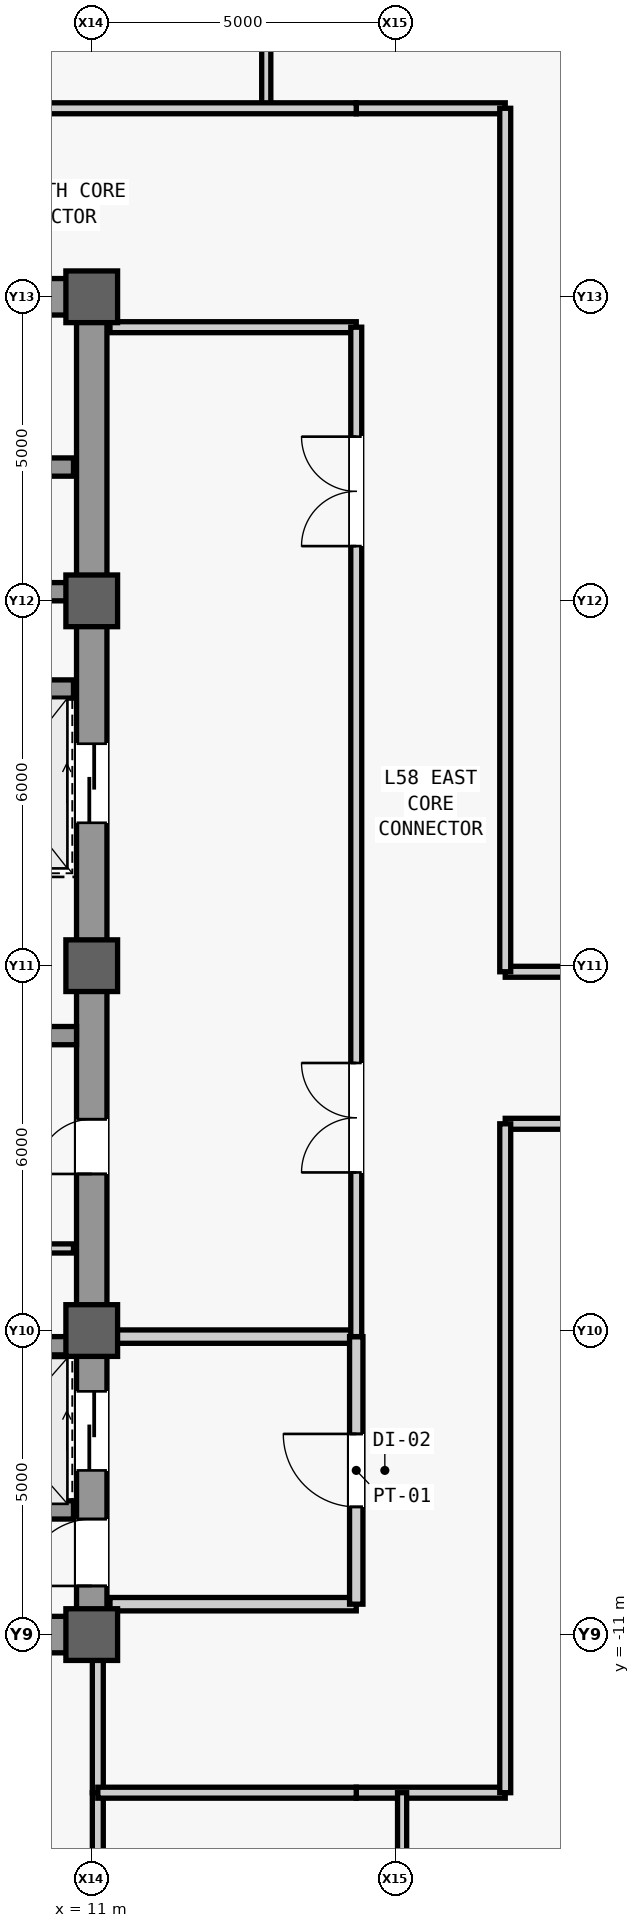
"""IFC4 building model, lengths in metres.
Left out: names, types, materials, properties, quantities, classifications, styles, units other than length and angle.
Written with IfcOpenShell. Run it as: python <this file> out.ifc"""

import sys

from ifc_helpers import new_model, si_unit, direction, frame, frame_2d, origin, origin_2d, place, context, subcontext, project, spatial, rectangle, extrude, source, transform, mapped, element, fill, save


model = new_model("IFC4")
c1 = context("Model", 3, precision=1e-05, world=origin(), true_north=direction((0.0, 1.0)))
c2 = subcontext(c1, "Body", "Model", "MODEL_VIEW")
j1 = project(units=[si_unit("LENGTHUNIT", "METRE"), si_unit("PLANEANGLEUNIT", "RADIAN")], contexts=[c1])
p1 = place(None, origin())
s1 = spatial("IfcSite", under=j1, at=p1, CompositionType="ELEMENT")
p2 = place(p1, origin())
s2 = spatial("IfcBuilding", under=s1, at=p2, CompositionType="ELEMENT")
p3 = place(p2, frame((0.0, 0.0, 247.1)))
s3 = spatial("IfcBuildingStorey", under=s2, at=p3, CompositionType="ELEMENT", Elevation=247.1)
m1 = source(origin(), c2, "Body", "SweptSolid", [
    extrude(rectangle(XDim=22.0, YDim=0.5, at=frame_2d((11.0, 0.0))), origin(), (0.0, 0.0, 1.0), 3.78),
])
p4 = place(p3, frame((11.0, -11.0, 0.0), z_axis=(0.0, 0.0, 1.0), x_axis=(0.0, 1.0, 0.0)))
e1 = element("IfcWall", 1, at=p4, inside=s3, PredefinedType="SHEAR", context=c2, shape_type="MappedRepresentation", body=[
    mapped(m1, transform((0.0, 0.0, 0.0), scale=1.0)),
])
m2 = source(origin(), c2, "Body", "SweptSolid", [
    extrude(rectangle(XDim=1.1, YDim=2.2, at=frame_2d((0.55, 1.1))), frame((0.0, 0.26, 0.0), z_axis=(0.0, -1.0, 0.0), x_axis=(1.0, 0.0, 0.0)), (0.0, 0.0, 1.0), 0.52),
])
p5 = place(p4, frame((0.8, 0.0, 0.0)))
e2 = element("IfcOpeningElement", 2, at=p5, cuts=e1, PredefinedType="OPENING", context=c2, shape_type="MappedRepresentation", body=[
    mapped(m2, transform((0.0, 0.0, 0.0), scale=1.0)),
])
m3 = source(origin(), c2, "Body", "SweptSolid", [
    extrude(rectangle(XDim=0.9, YDim=2.15, at=frame_2d((0.45, 1.075))), frame((0.0, 0.26, 0.0), z_axis=(0.0, -1.0, 0.0), x_axis=(1.0, 0.0, 0.0)), (0.0, 0.0, 1.0), 0.52),
])
p6 = place(p4, frame((7.575, 0.0, 0.0)))
e3 = element("IfcOpeningElement", 3, at=p6, cuts=e1, PredefinedType="OPENING", context=c2, shape_type="MappedRepresentation", body=[
    mapped(m3, transform((0.0, 0.0, 0.0), scale=1.0)),
])
m4 = source(origin(), c2, "Body", "SweptSolid", [
    extrude(rectangle(XDim=1.3, YDim=2.3, at=frame_2d((0.65, 1.15))), frame((0.0, 0.26, 0.0), z_axis=(0.0, -1.0, 0.0), x_axis=(1.0, 0.0, 0.0)), (0.0, 0.0, 1.0), 0.52),
])
p7 = place(p4, frame((2.7, 0.0, 0.0)))
e4 = element("IfcOpeningElement", 4, at=p7, cuts=e1, PredefinedType="OPENING", context=c2, shape_type="MappedRepresentation", body=[
    mapped(m4, transform((0.0, 0.0, 0.0), scale=1.0)),
])
p8 = place(p4, frame((13.35, 0.0, 0.0)))
e5 = element("IfcOpeningElement", 5, at=p8, cuts=e1, PredefinedType="OPENING", context=c2, shape_type="MappedRepresentation", body=[
    mapped(m4, transform((0.0, 0.0, 0.0), scale=1.0)),
])
m5 = source(origin(), c2, "Body", "SweptSolid", [
    extrude(rectangle(XDim=5.9, YDim=0.6, at=frame_2d((2.95, 0.0))), origin(), (0.0, 0.0, 1.0), 3.78),
])
p9 = place(p3, frame((4.85, -11.0, 0.0), z_axis=(0.0, 0.0, 1.0), x_axis=(1.0, 0.0, 0.0)))
e6 = element("IfcWall", 6, at=p9, inside=s3, PredefinedType="SHEAR", context=c2, shape_type="MappedRepresentation", body=[
    mapped(m5, transform((0.0, 0.0, 0.0), scale=1.0)),
])
p10 = place(p3, frame((4.85, 11.0, 0.0), z_axis=(0.0, 0.0, 1.0), x_axis=(1.0, 0.0, 0.0)))
e7 = element("IfcWall", 7, at=p10, inside=s3, PredefinedType="SHEAR", context=c2, shape_type="MappedRepresentation", body=[
    mapped(m5, transform((0.0, 0.0, 0.0), scale=1.0)),
])
m6 = source(origin(), c2, "Body", "SweptSolid", [
    extrude(rectangle(XDim=0.9, YDim=2.15, at=frame_2d((0.45, 1.075))), frame((0.0, 0.31, 0.0), z_axis=(0.0, -1.0, 0.0), x_axis=(1.0, 0.0, 0.0)), (0.0, 0.0, 1.0), 0.62),
])
p11 = place(p10, frame((0.5, 0.0, 0.0)))
e8 = element("IfcOpeningElement", 8, at=p11, cuts=e7, PredefinedType="OPENING", context=c2, shape_type="MappedRepresentation", body=[
    mapped(m6, transform((0.0, 0.0, 0.0), scale=1.0)),
])
m7 = source(origin(), c2, "Body", "SweptSolid", [
    extrude(rectangle(XDim=5.65, YDim=0.3, at=frame_2d((2.825, 0.0))), origin(), (0.0, 0.0, 1.0), 3.78),
])
p12 = place(p3, frame((5.1, -1.15, 0.0), z_axis=(0.0, 0.0, 1.0), x_axis=(1.0, 0.0, 0.0)))
e9 = element("IfcWall", 9, at=p12, inside=s3, PredefinedType="SHEAR", context=c2, shape_type="MappedRepresentation", body=[
    mapped(m7, transform((0.0, 0.0, 0.0), scale=1.0)),
])
m8 = source(origin(), c2, "Body", "SweptSolid", [
    extrude(rectangle(XDim=0.85, YDim=0.85, at=origin_2d()), origin(), (0.0, 0.0, 1.0), 4.0),
])
for number, where, z_axis, x_axis in (
    (10, (11.0, -11.0, 0.0), (0.0, 0.0, 1.0), (1.0, 0.0, 0.0)),
    (11, (11.0, -6.0, 0.0), (0.0, 0.0, 1.0), (1.0, 0.0, 0.0)),
    (12, (11.0, 0.0, 0.0), (0.0, 0.0, 1.0), (1.0, 0.0, 0.0)),
    (13, (11.0, 6.0, 0.0), (0.0, 0.0, 1.0), (1.0, 0.0, 0.0)),
    (14, (11.0, 11.0, 0.0), (0.0, 0.0, 1.0), (1.0, 0.0, 0.0)),
):
    element("IfcColumn", number, at=place(p3, frame(where, z_axis=z_axis, x_axis=x_axis)), inside=s3, PredefinedType="COLUMN", context=c2, shape_type="MappedRepresentation", body=[
        mapped(m8, transform((0.0, 0.0, 0.0), scale=1.0)),
    ])
m9 = source(origin(), c2, "Body", "SweptSolid", [
    extrude(rectangle(XDim=2.2, YDim=0.3, at=frame_2d((1.1, 0.0))), origin(), (0.0, 0.0, 1.0), 3.78),
])
for number, where, z_axis, x_axis in (
    (15, (8.5, -8.95, 0.0), (0.0, 0.0, 1.0), (1.0, 0.0, 0.0)),
    (16, (8.5, -6.25, 0.0), (0.0, 0.0, 1.0), (1.0, 0.0, 0.0)),
):
    element("IfcWall", number, at=place(p3, frame(where, z_axis=z_axis, x_axis=x_axis)), inside=s3, PredefinedType="SHEAR", context=c2, shape_type="MappedRepresentation", body=[
        mapped(m9, transform((0.0, 0.0, 0.0), scale=1.0)),
    ])
m10 = source(origin(), c2, "Body", "SweptSolid", [
    extrude(rectangle(XDim=2.3, YDim=0.3, at=frame_2d((1.15, 0.0))), origin(), (0.0, 0.0, 1.0), 3.78),
])
for number, where, z_axis, x_axis in (
    (17, (8.4, 4.55, 0.0), (0.0, 0.0, 1.0), (1.0, 0.0, 0.0)),
    (18, (8.4, 6.15, 0.0), (0.0, 0.0, 1.0), (1.0, 0.0, 0.0)),
    (19, (8.4, 8.2, 0.0), (0.0, 0.0, 1.0), (1.0, 0.0, 0.0)),
):
    element("IfcWall", number, at=place(p3, frame(where, z_axis=z_axis, x_axis=x_axis)), inside=s3, PredefinedType="SHEAR", context=c2, shape_type="MappedRepresentation", body=[
        mapped(m10, transform((0.0, 0.0, 0.0), scale=1.0)),
    ])
m11 = source(origin(), c2, "Body", "SweptSolid", [
    extrude(rectangle(XDim=2.05, YDim=0.15, at=frame_2d((1.025, 0.0))), origin(), (0.0, 0.0, 1.0), 3.78),
])
p13 = place(p3, frame((8.65, -4.65, 0.0), z_axis=(0.0, 0.0, 1.0), x_axis=(1.0, 0.0, 0.0)))
e20 = element("IfcWall", 20, at=p13, inside=s3, PredefinedType="PARTITIONING", context=c2, shape_type="MappedRepresentation", body=[
    mapped(m11, transform((0.0, 0.0, 0.0), scale=1.0)),
])
m12 = source(origin(), c2, "Body", "SweptSolid", [
    extrude(rectangle(XDim=4.05, YDim=0.22, at=frame_2d((2.025, 0.0))), origin(), (0.0, 0.0, 1.0), 3.78),
])
p14 = place(p3, frame((11.3, -10.5, 0.0), z_axis=(0.0, 0.0, 1.0), x_axis=(1.0, 0.0, 0.0)))
e21 = element("IfcWall", 21, at=p14, inside=s3, PredefinedType="PARTITIONING", context=c2, shape_type="MappedRepresentation", body=[
    mapped(m12, transform((0.0, 0.0, 0.0), scale=1.0)),
])
m13 = source(origin(), c2, "Body", "SweptSolid", [
    extrude(rectangle(XDim=4.05, YDim=0.22, at=frame_2d((2.025, 0.0))), origin(), (0.0, 0.0, 1.0), 3.085),
])
p15 = place(p3, frame((11.3, -6.1, 0.0), z_axis=(0.0, 0.0, 1.0), x_axis=(1.0, 0.0, 0.0)))
e22 = element("IfcWall", 22, at=p15, inside=s3, PredefinedType="PARTITIONING", context=c2, shape_type="MappedRepresentation", body=[
    mapped(m13, transform((0.0, 0.0, 0.0), scale=1.0)),
])
m14 = source(origin(), c2, "Body", "SweptSolid", [
    extrude(rectangle(XDim=4.4, YDim=0.22, at=frame_2d((2.2, 0.0))), origin(), (0.0, 0.0, 1.0), 3.78),
])
p16 = place(p3, frame((15.35, -10.5, 0.0), z_axis=(0.0, 0.0, 1.0), x_axis=(0.0, 1.0, 0.0)))
e23 = element("IfcWall", 23, at=p16, inside=s3, PredefinedType="PARTITIONING", context=c2, shape_type="MappedRepresentation", body=[
    mapped(m14, transform((0.0, 0.0, 0.0), scale=1.0)),
])
m15 = source(origin(), c2, "Body", "SweptSolid", [
    extrude(rectangle(XDim=1.2, YDim=2.2, at=frame_2d((0.6, 1.1))), frame((0.0, 0.12, 0.0), z_axis=(0.0, -1.0, 0.0), x_axis=(1.0, 0.0, 0.0)), (0.0, 0.0, 1.0), 0.24),
])
p17 = place(p16, frame((1.6, 0.0, 0.0)))
e24 = element("IfcOpeningElement", 24, at=p17, cuts=e23, PredefinedType="OPENING", context=c2, shape_type="MappedRepresentation", body=[
    mapped(m15, transform((0.0, 0.0, 0.0), scale=1.0)),
])
m16 = source(origin(), c2, "Body", "SweptSolid", [
    extrude(rectangle(XDim=4.05, YDim=0.18, at=frame_2d((2.025, 0.0))), origin(), (0.0, 0.0, 1.0), 3.78),
])
p18 = place(p3, frame((11.3, 10.5, 0.0), z_axis=(0.0, 0.0, 1.0), x_axis=(1.0, 0.0, 0.0)))
e25 = element("IfcWall", 25, at=p18, inside=s3, PredefinedType="PARTITIONING", context=c2, shape_type="MappedRepresentation", body=[
    mapped(m16, transform((0.0, 0.0, 0.0), scale=1.0)),
])
m17 = source(origin(), c2, "Body", "SweptSolid", [
    extrude(rectangle(XDim=16.6, YDim=0.18, at=frame_2d((8.3, 0.0))), origin(), (0.0, 0.0, 1.0), 3.78),
])
p19 = place(p3, frame((15.35, -6.1, 0.0), z_axis=(0.0, 0.0, 1.0), x_axis=(0.0, 1.0, 0.0)))
e26 = element("IfcWall", 26, at=p19, inside=s3, PredefinedType="PARTITIONING", context=c2, shape_type="MappedRepresentation", body=[
    mapped(m17, transform((0.0, 0.0, 0.0), scale=1.0)),
])
m18 = source(origin(), c2, "Body", "SweptSolid", [
    extrude(rectangle(XDim=1.8, YDim=2.25, at=frame_2d((0.9, 1.125))), frame((0.0, 0.1, 0.0), z_axis=(0.0, -1.0, 0.0), x_axis=(1.0, 0.0, 0.0)), (0.0, 0.0, 1.0), 0.2),
])
p20 = place(p19, frame((2.7, 0.0, 0.0)))
e27 = element("IfcOpeningElement", 27, at=p20, cuts=e26, PredefinedType="OPENING", context=c2, shape_type="MappedRepresentation", body=[
    mapped(m18, transform((0.0, 0.0, 0.0), scale=1.0)),
])
p21 = place(p19, frame((13.0, 0.0, 0.0)))
e28 = element("IfcOpeningElement", 28, at=p21, cuts=e26, PredefinedType="OPENING", context=c2, shape_type="MappedRepresentation", body=[
    mapped(m18, transform((0.0, 0.0, 0.0), scale=1.0)),
])
m19 = source(origin(), c2, "Body", "SweptSolid", [
    extrude(rectangle(XDim=2.45, YDim=0.18, at=frame_2d((1.225, 0.0))), origin(), (0.0, 0.0, 1.0), 3.78),
])
for number, where, z_axis, x_axis in (
    (29, (15.35, -13.6, 0.0), (0.0, 0.0, 1.0), (1.0, 0.0, 0.0)),
    (30, (15.35, 14.1, 0.0), (0.0, 0.0, 1.0), (1.0, 0.0, 0.0)),
):
    element("IfcWall", number, at=place(p3, frame(where, z_axis=z_axis, x_axis=x_axis)), inside=s3, PredefinedType="PARTITIONING", context=c2, shape_type="MappedRepresentation", body=[
        mapped(m19, transform((0.0, 0.0, 0.0), scale=1.0)),
    ])
m20 = source(origin(), c2, "Body", "SweptSolid", [
    extrude(rectangle(XDim=2.6, YDim=0.18, at=frame_2d((1.3, 0.0))), origin(), (0.0, 0.0, 1.0), 3.085),
])
p22 = place(p3, frame((11.1, -13.6, 0.0), z_axis=(0.0, 0.0, 1.0), x_axis=(0.0, 1.0, 0.0)))
e31 = element("IfcWall", 31, at=p22, inside=s3, PredefinedType="PARTITIONING", context=c2, shape_type="MappedRepresentation", body=[
    mapped(m20, transform((0.0, 0.0, 0.0), scale=1.0)),
])
m21 = source(origin(), c2, "Body", "SweptSolid", [
    extrude(rectangle(XDim=16.4, YDim=0.15, at=frame_2d((8.2, 0.0))), origin(), (0.0, 0.0, 1.0), 3.78),
])
p23 = place(p3, frame((16.104, -30.0, 0.0), z_axis=(0.0, 0.0, 1.0), x_axis=(0.0, 1.0, 0.0)))
e32 = element("IfcWall", 32, at=p23, inside=s3, PredefinedType="PARTITIONING", context=c2, shape_type="MappedRepresentation", body=[
    mapped(m21, transform((0.0, 0.0, 0.0), scale=1.0)),
])
m22 = source(origin(), c2, "Body", "SweptSolid", [
    extrude(rectangle(XDim=0.95, YDim=2.15, at=frame_2d((0.475, 1.075))), frame((0.0, 0.085, 0.0), z_axis=(0.0, -1.0, 0.0), x_axis=(1.0, 0.0, 0.0)), (0.0, 0.0, 1.0), 0.17),
])
p24 = place(p23, frame((11.825, 0.0, 0.0)))
e33 = element("IfcOpeningElement", 33, at=p24, cuts=e32, PredefinedType="OPENING", context=c2, shape_type="MappedRepresentation", body=[
    mapped(m22, transform((0.0, 0.0, 0.0), scale=1.0)),
])
m23 = source(origin(), c2, "Body", "SweptSolid", [
    extrude(rectangle(XDim=16.4, YDim=0.18, at=frame_2d((8.2, 0.0))), origin(), (0.0, 0.0, 1.0), 3.085),
])
p25 = place(p3, frame((11.1, -30.0, 0.0), z_axis=(0.0, 0.0, 1.0), x_axis=(0.0, 1.0, 0.0)))
e34 = element("IfcWall", 34, at=p25, inside=s3, PredefinedType="PARTITIONING", context=c2, shape_type="MappedRepresentation", body=[
    mapped(m23, transform((0.0, 0.0, 0.0), scale=1.0)),
])
m24 = source(origin(), c2, "Body", "SweptSolid", [
    extrude(rectangle(XDim=1.05, YDim=2.2, at=frame_2d((0.525, 1.1))), frame((0.0, 0.1, 0.0), z_axis=(0.0, -1.0, 0.0), x_axis=(1.0, 0.0, 0.0)), (0.0, 0.0, 1.0), 0.2),
])
p26 = place(p25, frame((3.575, 0.0, 0.0)))
e35 = element("IfcOpeningElement", 35, at=p26, cuts=e34, PredefinedType="OPENING", context=c2, shape_type="MappedRepresentation", body=[
    mapped(m24, transform((0.0, 0.0, 0.0), scale=1.0)),
])
m25 = source(origin(), c2, "Body", "SweptSolid", [
    extrude(rectangle(XDim=4.25, YDim=0.18, at=frame_2d((2.125, 0.0))), origin(), (0.0, 0.0, 1.0), 3.78),
])
p27 = place(p3, frame((11.1, -13.6, 0.0), z_axis=(0.0, 0.0, 1.0), x_axis=(1.0, 0.0, 0.0)))
e36 = element("IfcWall", 36, at=p27, inside=s3, PredefinedType="PARTITIONING", context=c2, shape_type="MappedRepresentation", body=[
    mapped(m25, transform((0.0, 0.0, 0.0), scale=1.0)),
])
m26 = source(origin(), c2, "Body", "SweptSolid", [
    extrude(rectangle(XDim=15.9, YDim=0.15, at=frame_2d((7.95, 0.0))), origin(), (0.0, 0.0, 1.0), 3.78),
])
p28 = place(p3, frame((13.87, 14.1, 0.0), z_axis=(0.0, 0.0, 1.0), x_axis=(0.0, 1.0, 0.0)))
e37 = element("IfcWall", 37, at=p28, inside=s3, PredefinedType="PARTITIONING", context=c2, shape_type="MappedRepresentation", body=[
    mapped(m26, transform((0.0, 0.0, 0.0), scale=1.0)),
])
p29 = place(p28, frame((11.45, 0.0, 0.0)))
e38 = element("IfcOpeningElement", 38, at=p29, cuts=e37, PredefinedType="OPENING", context=c2, shape_type="MappedRepresentation", body=[
    mapped(m22, transform((0.0, 0.0, 0.0), scale=1.0)),
])
m27 = source(origin(), c2, "Body", "SweptSolid", [
    extrude(rectangle(XDim=16.85, YDim=0.18, at=frame_2d((8.425, 0.0))), origin(), (0.0, 0.0, 1.0), 3.78),
])
p30 = place(p3, frame((-1.5, 14.1, 0.0), z_axis=(0.0, 0.0, 1.0), x_axis=(1.0, 0.0, 0.0)))
e39 = element("IfcWall", 39, at=p30, inside=s3, PredefinedType="PARTITIONING", context=c2, shape_type="MappedRepresentation", body=[
    mapped(m27, transform((0.0, 0.0, 0.0), scale=1.0)),
])
m28 = source(origin(), c2, "Body", "SweptSolid", [
    extrude(rectangle(XDim=12.2, YDim=0.18, at=frame_2d((6.1, 0.0))), origin(), (0.0, 0.0, 1.0), 3.78),
])
p31 = place(p3, frame((17.8, -2.6, 0.0), z_axis=(0.0, 0.0, 1.0), x_axis=(1.0, 0.0, 0.0)))
e40 = element("IfcWall", 40, at=p31, inside=s3, PredefinedType="PARTITIONING", context=c2, shape_type="MappedRepresentation", body=[
    mapped(m28, transform((0.0, 0.0, 0.0), scale=1.0)),
])
m29 = source(origin(), c2, "Body", "SweptSolid", [
    extrude(rectangle(XDim=0.95, YDim=2.15, at=frame_2d((0.475, 1.075))), frame((0.0, 0.1, 0.0), z_axis=(0.0, -1.0, 0.0), x_axis=(1.0, 0.0, 0.0)), (0.0, 0.0, 1.0), 0.2),
])
p32 = place(p31, frame((2.758, 0.0, 0.0)))
e41 = element("IfcOpeningElement", 41, at=p32, cuts=e40, PredefinedType="OPENING", context=c2, shape_type="MappedRepresentation", body=[
    mapped(m29, transform((0.0, 0.0, 0.0), scale=1.0)),
])
p33 = place(p31, frame((8.858, 0.0, 0.0)))
e42 = element("IfcOpeningElement", 42, at=p33, cuts=e40, PredefinedType="OPENING", context=c2, shape_type="MappedRepresentation", body=[
    mapped(m29, transform((0.0, 0.0, 0.0), scale=1.0)),
])
m30 = source(origin(), c2, "Body", "SweptSolid", [
    extrude(rectangle(XDim=11.0, YDim=0.18, at=frame_2d((5.5, 0.0))), origin(), (0.0, 0.0, 1.0), 3.78),
])
p34 = place(p3, frame((17.8, -13.6, 0.0), z_axis=(0.0, 0.0, 1.0), x_axis=(0.0, 1.0, 0.0)))
e43 = element("IfcWall", 43, at=p34, inside=s3, PredefinedType="PARTITIONING", context=c2, shape_type="MappedRepresentation", body=[
    mapped(m30, transform((0.0, 0.0, 0.0), scale=1.0)),
])
m31 = source(origin(), c2, "Body", "SweptSolid", [
    extrude(rectangle(XDim=12.2, YDim=0.18, at=frame_2d((6.1, 0.0))), origin(), (0.0, 0.0, 1.0), 3.085),
])
p35 = place(p3, frame((17.8, -0.1, 0.0), z_axis=(0.0, 0.0, 1.0), x_axis=(1.0, 0.0, 0.0)))
e44 = element("IfcWall", 44, at=p35, inside=s3, PredefinedType="PARTITIONING", context=c2, shape_type="MappedRepresentation", body=[
    mapped(m31, transform((0.0, 0.0, 0.0), scale=1.0)),
])
p36 = place(p35, frame((2.758, 0.0, 0.0)))
e45 = element("IfcOpeningElement", 45, at=p36, cuts=e44, PredefinedType="OPENING", context=c2, shape_type="MappedRepresentation", body=[
    mapped(m29, transform((0.0, 0.0, 0.0), scale=1.0)),
])
p37 = place(p35, frame((8.858, 0.0, 0.0)))
e46 = element("IfcOpeningElement", 46, at=p37, cuts=e44, PredefinedType="OPENING", context=c2, shape_type="MappedRepresentation", body=[
    mapped(m29, transform((0.0, 0.0, 0.0), scale=1.0)),
])
m32 = source(origin(), c2, "Body", "SweptSolid", [
    extrude(rectangle(XDim=14.2, YDim=0.18, at=frame_2d((7.1, 0.0))), origin(), (0.0, 0.0, 1.0), 3.78),
])
p38 = place(p3, frame((17.8, -0.1, 0.0), z_axis=(0.0, 0.0, 1.0), x_axis=(0.0, 1.0, 0.0)))
e47 = element("IfcWall", 47, at=p38, inside=s3, PredefinedType="PARTITIONING", context=c2, shape_type="MappedRepresentation", body=[
    mapped(m32, transform((0.0, 0.0, 0.0), scale=1.0)),
])
m33 = source(origin(), c2, "Body", "SweptSolid", [
    extrude(rectangle(XDim=1.1, YDim=2.2, at=frame_2d((0.55, 1.1))), frame((0.0, 0.025, 0.0), z_axis=(0.0, -1.0, 0.0), x_axis=(1.0, 0.0, 0.0)), (0.0, 0.0, 1.0), 0.05),
])
p39 = place(p5, origin())
e48 = element("IfcDoor", 48, at=p39, inside=s3, OperationType="SINGLE_SWING_LEFT", PredefinedType="DOOR", context=c2, shape_type="MappedRepresentation", body=[
    mapped(m33, transform((0.0, 0.0, 0.0), scale=1.0)),
])
fill(e2, e48)
m34 = source(origin(), c2, "Body", "SweptSolid", [
    extrude(rectangle(XDim=0.9, YDim=2.15, at=frame_2d((0.45, 1.075))), frame((0.0, 0.025, 0.0), z_axis=(0.0, -1.0, 0.0), x_axis=(1.0, 0.0, 0.0)), (0.0, 0.0, 1.0), 0.05),
])
p40 = place(p6, origin())
e49 = element("IfcDoor", 49, at=p40, inside=s3, OperationType="SINGLE_SWING_LEFT", PredefinedType="DOOR", context=c2, shape_type="MappedRepresentation", body=[
    mapped(m34, transform((0.0, 0.0, 0.0), scale=1.0)),
])
fill(e3, e49)
m35 = source(origin(), c2, "Body", "SweptSolid", [
    extrude(rectangle(XDim=1.2, YDim=2.2, at=frame_2d((0.6, 1.1))), frame((0.0, 0.025, 0.0), z_axis=(0.0, -1.0, 0.0), x_axis=(1.0, 0.0, 0.0)), (0.0, 0.0, 1.0), 0.05),
])
p41 = place(p17, origin())
e50 = element("IfcDoor", 50, at=p41, inside=s3, OperationType="SINGLE_SWING_RIGHT", PredefinedType="DOOR", context=c2, shape_type="MappedRepresentation", body=[
    mapped(m35, transform((0.0, 0.0, 0.0), scale=1.0)),
])
fill(e24, e50)
m36 = source(origin(), c2, "Body", "SweptSolid", [
    extrude(rectangle(XDim=1.8, YDim=2.25, at=frame_2d((0.9, 1.125))), frame((0.0, 0.025, 0.0), z_axis=(0.0, -1.0, 0.0), x_axis=(1.0, 0.0, 0.0)), (0.0, 0.0, 1.0), 0.05),
])
p42 = place(p20, origin())
e51 = element("IfcDoor", 51, at=p42, inside=s3, OperationType="SINGLE_SWING_RIGHT", PredefinedType="DOOR", context=c2, shape_type="MappedRepresentation", body=[
    mapped(m36, transform((0.0, 0.0, 0.0), scale=1.0)),
])
fill(e27, e51)
p43 = place(p21, origin())
e52 = element("IfcDoor", 52, at=p43, inside=s3, OperationType="SINGLE_SWING_LEFT", PredefinedType="DOOR", context=c2, shape_type="MappedRepresentation", body=[
    mapped(m36, transform((0.0, 0.0, 0.0), scale=1.0)),
])
fill(e28, e52)
m37 = source(origin(), c2, "Body", "SweptSolid", [
    extrude(rectangle(XDim=1.3, YDim=2.3, at=frame_2d((0.65, 1.15))), frame((0.0, 0.025, 0.0), z_axis=(0.0, -1.0, 0.0), x_axis=(1.0, 0.0, 0.0)), (0.0, 0.0, 1.0), 0.05),
])
p44 = place(p7, origin())
e53 = element("IfcDoor", 53, at=p44, inside=s3, OperationType="SLIDING_TO_LEFT", PredefinedType="DOOR", context=c2, shape_type="MappedRepresentation", body=[
    mapped(m37, transform((0.0, 0.0, 0.0), scale=1.0)),
])
fill(e4, e53)
p45 = place(p8, origin())
e54 = element("IfcDoor", 54, at=p45, inside=s3, OperationType="SLIDING_TO_LEFT", PredefinedType="DOOR", context=c2, shape_type="MappedRepresentation", body=[
    mapped(m37, transform((0.0, 0.0, 0.0), scale=1.0)),
])
fill(e5, e54)
save(model, sys.argv[1])
